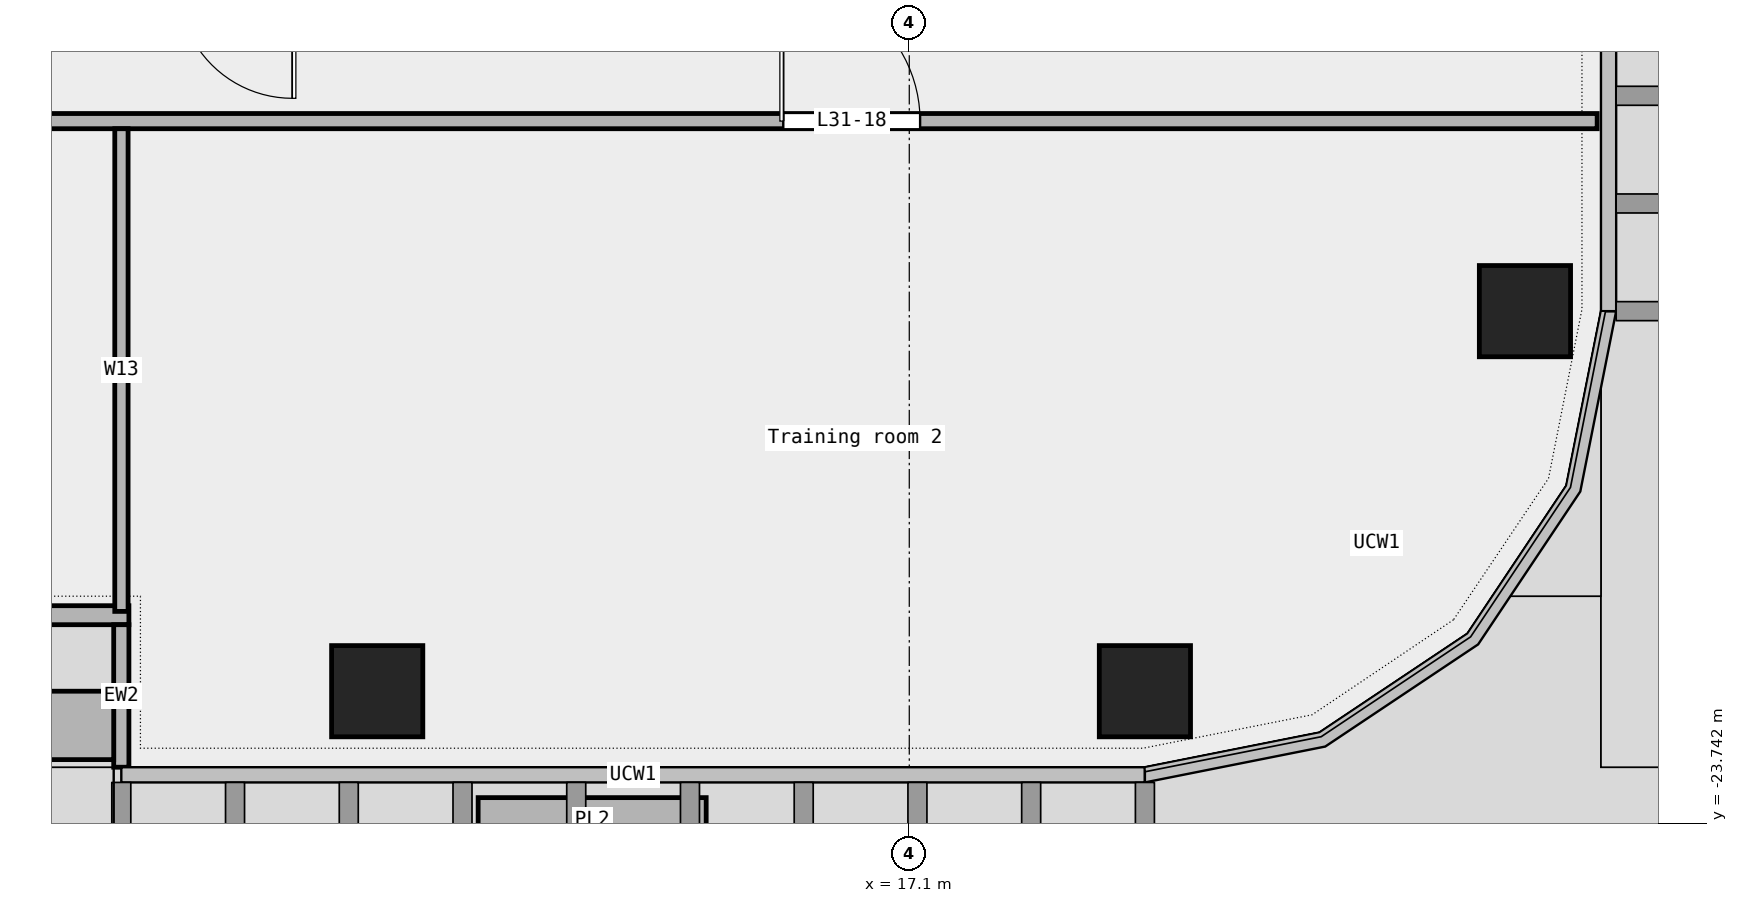
"""IFC4 building model, lengths in metres.
Left out: names, types, materials, properties, quantities, classifications, styles, units other than length and angle.
Written with IfcOpenShell. Run it as: python <this file> out.ifc"""

import sys

from ifc_helpers import new_model, si_unit, direction, frame, frame_2d, origin, origin_2d, place, context, subcontext, project, spatial, rectangle, extrude, element, fill, save


model = new_model("IFC4")
c1 = context("Model", 3, precision=1e-05, world=origin(), true_north=direction((0.0, 1.0)))
c2 = subcontext(c1, "Body", "Model", "MODEL_VIEW")
j1 = project(units=[si_unit("LENGTHUNIT", "METRE"), si_unit("PLANEANGLEUNIT", "RADIAN")], contexts=[c1])
p1 = place(None, origin())
s1 = spatial("IfcSite", under=j1, at=p1, CompositionType="ELEMENT")
p2 = place(p1, origin())
s2 = spatial("IfcBuilding", under=s1, at=p2, CompositionType="ELEMENT")
p3 = place(p2, frame((0.0, 0.0, 157.0)))
s3 = spatial("IfcBuildingStorey", under=s2, at=p3, CompositionType="ELEMENT", Elevation=157.0)
for number, where, z_axis, x_axis in (
    (1, (10.1, -22.0, 0.0), (0.0, 0.0, 1.0), (1.0, 0.0, 0.0)),
    (2, (20.2, -22.0, 0.0), (0.0, 0.0, 1.0), (1.0, 0.0, 0.0)),
    (3, (25.2, -17.0, 0.0), (0.0, 0.0, 1.0), (1.0, 0.0, 0.0)),
):
    element("IfcColumn", number, at=place(p3, frame(where, z_axis=z_axis, x_axis=x_axis)), inside=s3, PredefinedType="COLUMN", context=c2, shape_type="SweptSolid", body=[
        extrude(rectangle(XDim=1.2, YDim=1.2, at=origin_2d()), origin(), (0.0, 0.0, 1.0), 3.6),
    ])
p4 = place(p3, frame((-6.833, -21.0, 0.0), z_axis=(0.0, 0.0, 1.0), x_axis=(1.0, 0.0, 0.0)))
e4 = element("IfcWall", 4, at=p4, inside=s3, PredefinedType="STANDARD", context=c2, shape_type="SweptSolid", body=[
    extrude(rectangle(XDim=13.667, YDim=0.25, at=frame_2d((6.833, 0.0))), origin(), (0.0, 0.0, 1.0), 3.6),
])
p5 = place(p4, frame((1.75, 0.0, 0.45)))
e5 = element("IfcOpeningElement", 5, at=p5, cuts=e4, PredefinedType="OPENING", context=c2, shape_type="SweptSolid", body=[
    extrude(rectangle(XDim=1.5, YDim=2.4, at=frame_2d((0.75, 1.2))), frame((0.0, 0.137, 0.0), z_axis=(0.0, -1.0, 0.0), x_axis=(1.0, 0.0, 0.0)), (0.0, 0.0, 1.0), 0.274),
])
p6 = place(p4, frame((7.75, 0.0, 0.0)))
e6 = element("IfcOpeningElement", 6, at=p6, cuts=e4, PredefinedType="OPENING", context=c2, shape_type="SweptSolid", body=[
    extrude(rectangle(XDim=1.8, YDim=2.4, at=frame_2d((0.9, 1.2))), frame((0.0, 0.137, 0.0), z_axis=(0.0, -1.0, 0.0), x_axis=(1.0, 0.0, 0.0)), (0.0, 0.0, 1.0), 0.274),
])
p7 = place(p4, frame((10.5, 0.0, 0.45)))
e7 = element("IfcOpeningElement", 7, at=p7, cuts=e4, PredefinedType="OPENING", context=c2, shape_type="SweptSolid", body=[
    extrude(rectangle(XDim=1.5, YDim=2.4, at=frame_2d((0.75, 1.2))), frame((0.0, 0.137, 0.0), z_axis=(0.0, -1.0, 0.0), x_axis=(1.0, 0.0, 0.0)), (0.0, 0.0, 1.0), 0.274),
])
p8 = place(p3, frame((6.733, -23.0, 0.0), z_axis=(0.0, 0.0, 1.0), x_axis=(0.0, 1.0, 0.0)))
e8 = element("IfcWall", 8, at=p8, inside=s3, PredefinedType="STANDARD", context=c2, shape_type="SweptSolid", body=[
    extrude(rectangle(XDim=1.875, YDim=0.2, at=frame_2d((0.938, 0.0))), origin(), (0.0, 0.0, 1.0), 3.6),
])
p9 = place(p3, frame((3.033, -22.45, 0.0), z_axis=(0.0, 0.0, 1.0), x_axis=(1.0, 0.0, 0.0)))
e9 = element("IfcWall", 9, at=p9, inside=s3, PredefinedType="STANDARD", context=c2, shape_type="SweptSolid", body=[
    extrude(rectangle(XDim=3.6, YDim=0.9, at=frame_2d((1.8, 0.0))), origin(), (0.0, 0.0, 1.0), 0.7),
])
p10 = place(p3, frame((11.428, -23.7, 0.0), z_axis=(0.0, 0.0, 1.0), x_axis=(1.0, 0.0, 0.0)))
e10 = element("IfcWall", 10, at=p10, inside=s3, PredefinedType="STANDARD", context=c2, shape_type="SweptSolid", body=[
    extrude(rectangle(XDim=3.0, YDim=0.6, at=frame_2d((1.5, 0.0))), origin(), (0.0, 0.0, 1.0), 0.7),
])
p11 = place(p3, frame((-26.15, -14.5, 0.0), z_axis=(0.0, 0.0, 1.0), x_axis=(1.0, 0.0, 0.0)))
e11 = element("IfcWall", 11, at=p11, inside=s3, PredefinedType="PARTITIONING", context=c2, shape_type="SweptSolid", body=[
    extrude(rectangle(XDim=52.3, YDim=0.2, at=frame_2d((26.15, 0.0))), origin(), (0.0, 0.0, 1.0), 3.6),
])
p12 = place(p11, frame((25.55, 0.0, 0.0)))
e12 = element("IfcOpeningElement", 12, at=p12, cuts=e11, PredefinedType="OPENING", context=c2, shape_type="SweptSolid", body=[
    extrude(rectangle(XDim=1.2, YDim=2.1, at=frame_2d((0.6, 1.05))), frame((0.0, 0.112, 0.0), z_axis=(0.0, -1.0, 0.0), x_axis=(1.0, 0.0, 0.0)), (0.0, 0.0, 1.0), 0.224),
])
p13 = place(p11, frame((8.907, 0.0, 0.0)))
e13 = element("IfcOpeningElement", 13, at=p13, cuts=e11, PredefinedType="OPENING", context=c2, shape_type="SweptSolid", body=[
    extrude(rectangle(XDim=1.8, YDim=2.1, at=frame_2d((0.9, 1.05))), frame((0.0, 0.112, 0.0), z_axis=(0.0, -1.0, 0.0), x_axis=(1.0, 0.0, 0.0)), (0.0, 0.0, 1.0), 0.224),
])
p14 = place(p11, frame((41.593, 0.0, 0.0)))
e14 = element("IfcOpeningElement", 14, at=p14, cuts=e11, PredefinedType="OPENING", context=c2, shape_type="SweptSolid", body=[
    extrude(rectangle(XDim=1.8, YDim=2.1, at=frame_2d((0.9, 1.05))), frame((0.0, 0.112, 0.0), z_axis=(0.0, -1.0, 0.0), x_axis=(1.0, 0.0, 0.0)), (0.0, 0.0, 1.0), 0.224),
])
p15 = place(p3, frame((6.735, -20.95, 0.0), z_axis=(0.0, 0.0, 1.0), x_axis=(0.0, 1.0, 0.0)))
e15 = element("IfcWall", 15, at=p15, inside=s3, PredefinedType="PARTITIONING", context=c2, shape_type="SweptSolid", body=[
    extrude(rectangle(XDim=6.35, YDim=0.175, at=frame_2d((3.175, 0.0))), origin(), (0.0, 0.0, 1.0), 3.6),
])
p16 = place(p14, origin())
e16 = element("IfcDoor", 16, at=p16, inside=s3, OperationType="DOUBLE_DOOR_SINGLE_SWING", PredefinedType="DOOR", context=c2, shape_type="SweptSolid", body=[
    extrude(rectangle(XDim=1.8, YDim=2.1, at=frame_2d((0.9, 1.05))), frame((0.0, 0.025, 0.0), z_axis=(0.0, -1.0, 0.0), x_axis=(1.0, 0.0, 0.0)), (0.0, 0.0, 1.0), 0.05),
])
fill(e14, e16)
save(model, sys.argv[1])
